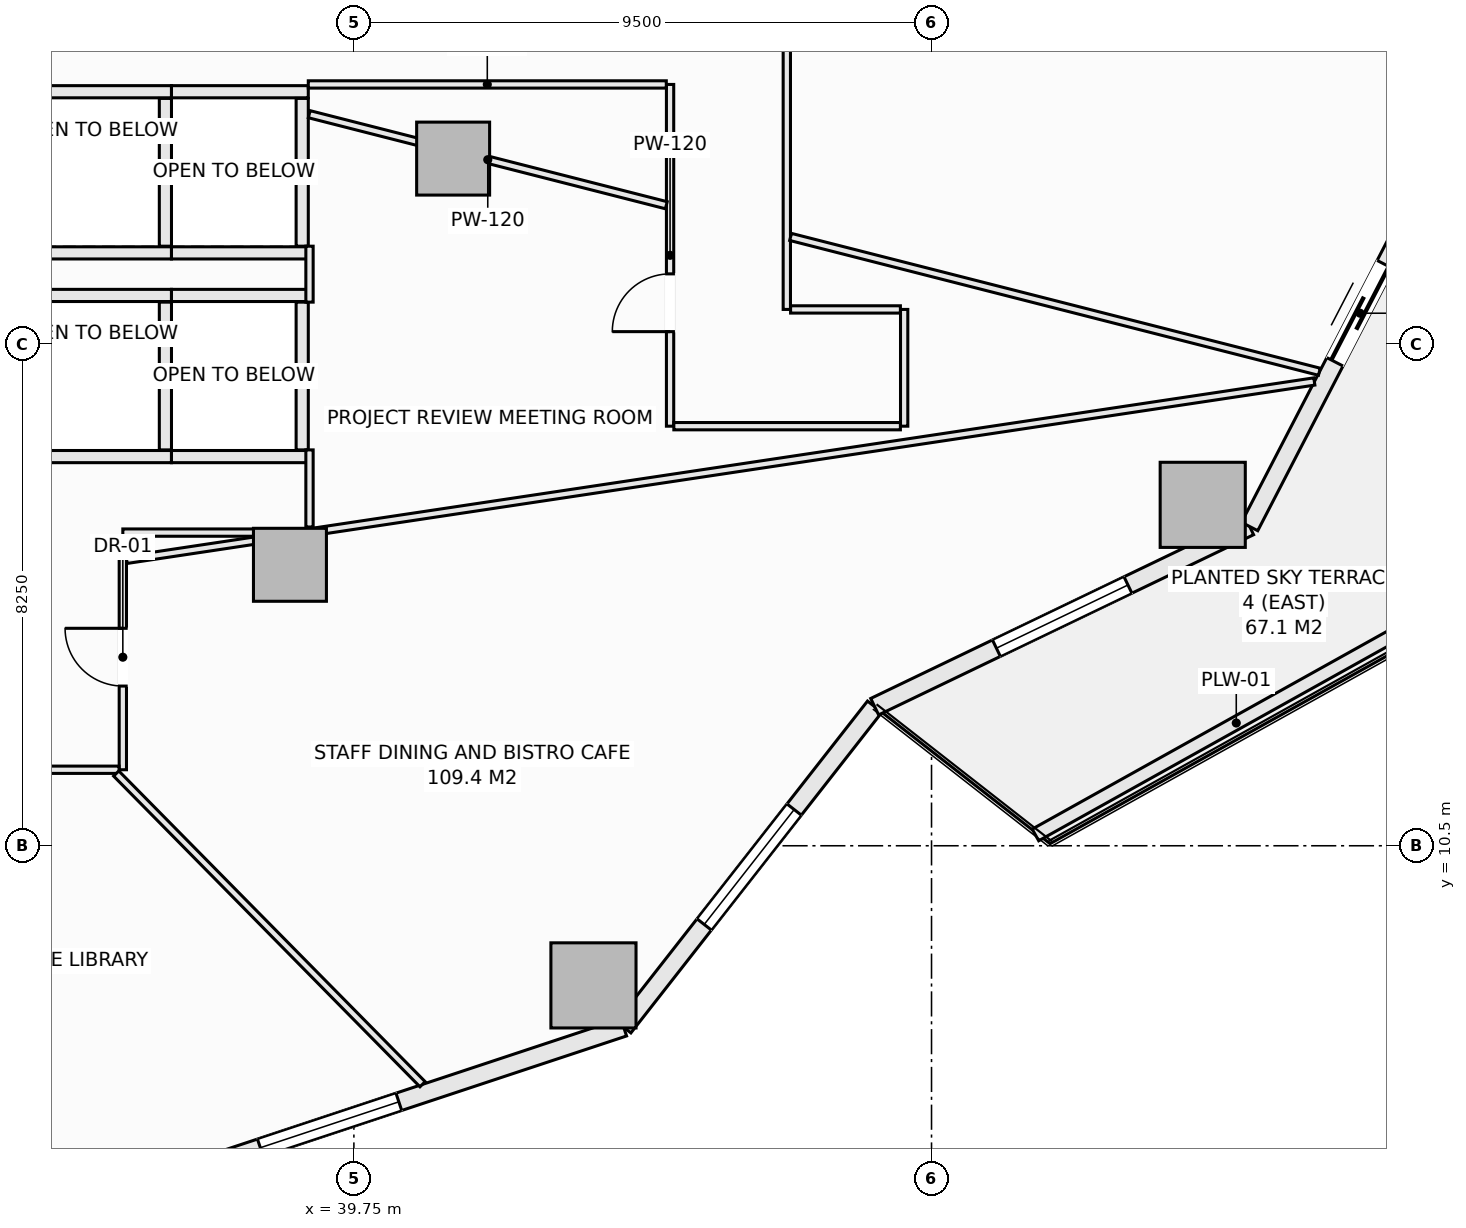
"""IFC4 building model, lengths in metres.
Left out: names, types, materials, properties, quantities, classifications, styles, units other than length and angle.
Written with IfcOpenShell. Run it as: python <this file> out.ifc"""

import sys

from ifc_helpers import new_model, si_unit, direction, frame, frame_2d, origin, origin_2d, place, context, subcontext, project, spatial, rectangle, extrude, element, fill, save


model = new_model("IFC4")
c1 = context("Model", 3, precision=1e-05, world=origin(), true_north=direction((0.0, 1.0)))
c2 = subcontext(c1, "Body", "Model", "MODEL_VIEW")
j1 = project(units=[si_unit("LENGTHUNIT", "METRE"), si_unit("PLANEANGLEUNIT", "RADIAN")], contexts=[c1])
p1 = place(None, origin())
s1 = spatial("IfcSite", under=j1, at=p1, CompositionType="ELEMENT")
p2 = place(p1, origin())
s2 = spatial("IfcBuilding", under=s1, at=p2, CompositionType="ELEMENT")
p3 = place(p2, frame((0.0, 0.0, 49.6)))
s3 = spatial("IfcBuildingStorey", under=s2, at=p3, CompositionType="ELEMENT", Elevation=49.6)
for number, where, z_axis, x_axis in (
    (1, (43.69, 8.204, -0.28), (0.0, 0.0, 1.0), (1.0, 0.0, 0.0)),
    (2, (53.71, 16.106, -0.28), (0.0, 0.0, 1.0), (1.0, 0.0, 0.0)),
):
    element("IfcColumn", number, at=place(p3, frame(where, z_axis=z_axis, x_axis=x_axis)), inside=s3, PredefinedType="COLUMN", context=c2, shape_type="SweptSolid", body=[
        extrude(rectangle(XDim=1.4, YDim=1.4, at=origin_2d()), origin(), (0.0, 0.0, 1.0), 3.85),
    ])
for number, where, z_axis, x_axis in (
    (3, (38.698, 15.121, -0.28), (0.0, 0.0, 1.0), (1.0, 0.0, 0.0)),
    (4, (41.382, 21.801, -0.28), (0.0, 0.0, 1.0), (1.0, 0.0, 0.0)),
):
    element("IfcColumn", number, at=place(p3, frame(where, z_axis=z_axis, x_axis=x_axis)), inside=s3, PredefinedType="COLUMN", context=c2, shape_type="SweptSolid", body=[
        extrude(rectangle(XDim=1.2, YDim=1.2, at=origin_2d()), origin(), (0.0, 0.0, 1.0), 3.85),
    ])
p4 = place(p3, frame((37.404, 5.267, 0.0), z_axis=(0.0, 0.0, 1.0), x_axis=(0.949238715533, 0.31455661006, 0.0)))
e5 = element("IfcWall", 5, at=p4, inside=s3, PredefinedType="SOLIDWALL", context=c2, shape_type="SweptSolid", body=[
    extrude(rectangle(XDim=7.146, YDim=0.3, at=frame_2d((3.573, 0.0))), origin(), (0.0, 0.0, 1.0), 3.093),
])
p5 = place(p4, frame((0.85, 0.0, 0.85)))
e6 = element("IfcOpeningElement", 6, at=p5, cuts=e5, PredefinedType="OPENING", context=c2, shape_type="SweptSolid", body=[
    extrude(rectangle(XDim=2.4, YDim=1.9, at=frame_2d((1.2, 0.95))), frame((0.0, 0.16, 0.0), z_axis=(0.0, -1.0, 0.0), x_axis=(1.0, 0.0, 0.0)), (0.0, 0.0, 1.0), 0.32),
])
p6 = place(p3, frame((44.188, 7.514, 0.0), z_axis=(0.0, 0.0, 1.0), x_axis=(0.616421309777, 0.787416515482, 0.0)))
e7 = element("IfcWall", 7, at=p6, inside=s3, PredefinedType="SOLIDWALL", context=c2, shape_type="SweptSolid", body=[
    extrude(rectangle(XDim=6.696, YDim=0.3, at=frame_2d((3.348, 0.0))), origin(), (0.0, 0.0, 1.0), 3.093),
])
p7 = place(p6, frame((2.148, 0.0, 0.85)))
e8 = element("IfcOpeningElement", 8, at=p7, cuts=e7, PredefinedType="OPENING", context=c2, shape_type="SweptSolid", body=[
    extrude(rectangle(XDim=2.4, YDim=1.9, at=frame_2d((1.2, 0.95))), frame((0.0, 0.16, 0.0), z_axis=(0.0, -1.0, 0.0), x_axis=(1.0, 0.0, 0.0)), (0.0, 0.0, 1.0), 0.32),
])
p8 = place(p3, frame((48.315, 12.787, 0.0), z_axis=(0.0, 0.0, 1.0), x_axis=(0.901360393999, 0.433069786673, 0.0)))
e9 = element("IfcWall", 9, at=p8, inside=s3, PredefinedType="SOLIDWALL", context=c2, shape_type="SweptSolid", body=[
    extrude(rectangle(XDim=6.842, YDim=0.3, at=frame_2d((3.421, 0.0))), origin(), (0.0, 0.0, 1.0), 3.093),
])
p9 = place(p8, frame((2.221, 0.0, 0.85)))
e10 = element("IfcOpeningElement", 10, at=p9, cuts=e9, PredefinedType="OPENING", context=c2, shape_type="SweptSolid", body=[
    extrude(rectangle(XDim=2.4, YDim=1.9, at=frame_2d((1.2, 0.95))), frame((0.0, 0.16, 0.0), z_axis=(0.0, -1.0, 0.0), x_axis=(1.0, 0.0, 0.0)), (0.0, 0.0, 1.0), 0.32),
])
p10 = place(p3, frame((54.482, 15.75, 0.0), z_axis=(0.0, 0.0, 1.0), x_axis=(0.459809804413, 0.88801742312, 0.0)))
e11 = element("IfcWall", 11, at=p10, inside=s3, PredefinedType="SOLIDWALL", context=c2, shape_type="SweptSolid", body=[
    extrude(rectangle(XDim=6.111, YDim=0.3, at=frame_2d((3.055, 0.0))), origin(), (0.0, 0.0, 1.0), 3.093),
])
p11 = place(p10, frame((3.05, 0.0, 0.0)))
e12 = element("IfcOpeningElement", 12, at=p11, cuts=e11, PredefinedType="OPENING", context=c2, shape_type="SweptSolid", body=[
    extrude(rectangle(XDim=1.8, YDim=2.25, at=frame_2d((0.9, 1.125))), frame((0.0, 0.16, 0.0), z_axis=(0.0, -1.0, 0.0), x_axis=(1.0, 0.0, 0.0)), (0.0, 0.0, 1.0), 0.32),
])
p12 = place(p3, frame((50.959, 10.678, 0.0), z_axis=(0.0, 0.0, 1.0), x_axis=(0.873500119739, 0.48682393205, 0.0)))
e13 = element("IfcWall", 13, at=p12, inside=s3, PredefinedType="PARAPET", context=c2, shape_type="SweptSolid", body=[
    extrude(rectangle(XDim=7.562, YDim=0.22, at=frame_2d((3.781, 0.0))), origin(), (0.0, 0.0, 1.0), 0.52),
])
for number, where, z_axis, x_axis in (
    (14, (34.5, 19.55, 0.0), (0.0, 0.0, 1.0), (1.0, 0.0, 0.0)),
    (15, (34.5, 16.9, 0.0), (0.0, 0.0, 1.0), (1.0, 0.0, 0.0)),
):
    element("IfcWall", number, at=place(p3, frame(where, z_axis=z_axis, x_axis=x_axis)), inside=s3, PredefinedType="SOLIDWALL", context=c2, shape_type="SweptSolid", body=[
        extrude(rectangle(XDim=2.25, YDim=0.2, at=frame_2d((1.125, 0.0))), origin(), (0.0, 0.0, 1.0), 3.57),
    ])
p13 = place(p3, frame((36.65, 17.01, 0.0), z_axis=(0.0, 0.0, 1.0), x_axis=(0.0, 1.0, 0.0)))
e16 = element("IfcWall", 16, at=p13, inside=s3, PredefinedType="SOLIDWALL", context=c2, shape_type="SweptSolid", body=[
    extrude(rectangle(XDim=2.43, YDim=0.2, at=frame_2d((1.215, 0.0))), origin(), (0.0, 0.0, 1.0), 3.57),
])
for number, where, z_axis, x_axis in (
    (17, (36.75, 19.55, 0.0), (0.0, 0.0, 1.0), (1.0, 0.0, 0.0)),
    (18, (36.75, 16.9, 0.0), (0.0, 0.0, 1.0), (1.0, 0.0, 0.0)),
):
    element("IfcWall", number, at=place(p3, frame(where, z_axis=z_axis, x_axis=x_axis)), inside=s3, PredefinedType="SOLIDWALL", context=c2, shape_type="SweptSolid", body=[
        extrude(rectangle(XDim=2.25, YDim=0.2, at=frame_2d((1.125, 0.0))), origin(), (0.0, 0.0, 1.0), 3.57),
    ])
p14 = place(p3, frame((38.9, 17.01, 0.0), z_axis=(0.0, 0.0, 1.0), x_axis=(0.0, 1.0, 0.0)))
e19 = element("IfcWall", 19, at=p14, inside=s3, PredefinedType="SOLIDWALL", context=c2, shape_type="SweptSolid", body=[
    extrude(rectangle(XDim=2.43, YDim=0.2, at=frame_2d((1.215, 0.0))), origin(), (0.0, 0.0, 1.0), 3.57),
])
for number, where, z_axis, x_axis in (
    (20, (34.5, 22.9, 0.0), (0.0, 0.0, 1.0), (1.0, 0.0, 0.0)),
    (21, (34.5, 20.25, 0.0), (0.0, 0.0, 1.0), (1.0, 0.0, 0.0)),
):
    element("IfcWall", number, at=place(p3, frame(where, z_axis=z_axis, x_axis=x_axis)), inside=s3, PredefinedType="SOLIDWALL", context=c2, shape_type="SweptSolid", body=[
        extrude(rectangle(XDim=2.25, YDim=0.2, at=frame_2d((1.125, 0.0))), origin(), (0.0, 0.0, 1.0), 3.57),
    ])
p15 = place(p3, frame((36.65, 20.36, 0.0), z_axis=(0.0, 0.0, 1.0), x_axis=(0.0, 1.0, 0.0)))
e22 = element("IfcWall", 22, at=p15, inside=s3, PredefinedType="SOLIDWALL", context=c2, shape_type="SweptSolid", body=[
    extrude(rectangle(XDim=2.43, YDim=0.2, at=frame_2d((1.215, 0.0))), origin(), (0.0, 0.0, 1.0), 3.57),
])
for number, where, z_axis, x_axis in (
    (23, (36.75, 22.9, 0.0), (0.0, 0.0, 1.0), (1.0, 0.0, 0.0)),
    (24, (36.75, 20.25, 0.0), (0.0, 0.0, 1.0), (1.0, 0.0, 0.0)),
):
    element("IfcWall", number, at=place(p3, frame(where, z_axis=z_axis, x_axis=x_axis)), inside=s3, PredefinedType="SOLIDWALL", context=c2, shape_type="SweptSolid", body=[
        extrude(rectangle(XDim=2.25, YDim=0.2, at=frame_2d((1.125, 0.0))), origin(), (0.0, 0.0, 1.0), 3.57),
    ])
p16 = place(p3, frame((38.9, 20.36, 0.0), z_axis=(0.0, 0.0, 1.0), x_axis=(0.0, 1.0, 0.0)))
e25 = element("IfcWall", 25, at=p16, inside=s3, PredefinedType="SOLIDWALL", context=c2, shape_type="SweptSolid", body=[
    extrude(rectangle(XDim=2.43, YDim=0.2, at=frame_2d((1.215, 0.0))), origin(), (0.0, 0.0, 1.0), 3.57),
])
p17 = place(p3, frame((35.95, 15.65, 0.0), z_axis=(0.0, 0.0, 1.0), x_axis=(1.0, 0.0, 0.0)))
e26 = element("IfcWall", 26, at=p17, inside=s3, PredefinedType="PARTITIONING", context=c2, shape_type="SweptSolid", body=[
    extrude(rectangle(XDim=2.291, YDim=0.12, at=frame_2d((1.146, 0.0))), origin(), (0.0, 0.0, 1.0), 3.57),
])
p18 = place(p3, frame((35.95, 11.75, 0.0), z_axis=(0.0, 0.0, 1.0), x_axis=(0.0, 1.0, 0.0)))
e27 = element("IfcWall", 27, at=p18, inside=s3, PredefinedType="PARTITIONING", context=c2, shape_type="SweptSolid", body=[
    extrude(rectangle(XDim=3.838, YDim=0.12, at=frame_2d((1.919, 0.0))), origin(), (0.0, 0.0, 1.0), 3.57),
])
p19 = place(p18, frame((1.376, 0.0, 0.0)))
e28 = element("IfcOpeningElement", 28, at=p19, cuts=e27, PredefinedType="OPENING", context=c2, shape_type="SweptSolid", body=[
    extrude(rectangle(XDim=0.95, YDim=2.1, at=frame_2d((0.475, 1.05))), frame((0.0, 0.07, 0.0), z_axis=(0.0, -1.0, 0.0), x_axis=(1.0, 0.0, 0.0)), (0.0, 0.0, 1.0), 0.14),
])
p20 = place(p3, frame((27.242, 11.75, 0.0), z_axis=(0.0, 0.0, 1.0), x_axis=(1.0, 0.0, 0.0)))
e29 = element("IfcWall", 29, at=p20, inside=s3, PredefinedType="PARTITIONING", context=c2, shape_type="SweptSolid", body=[
    extrude(rectangle(XDim=8.646, YDim=0.12, at=frame_2d((4.323, 0.0))), origin(), (0.0, 0.0, 1.0), 3.57),
])
p21 = place(p20, frame((2.311, 0.0, 0.0)))
e30 = element("IfcOpeningElement", 30, at=p21, cuts=e29, PredefinedType="OPENING", context=c2, shape_type="SweptSolid", body=[
    extrude(rectangle(XDim=0.95, YDim=2.1, at=frame_2d((0.475, 1.05))), frame((0.0, 0.07, 0.0), z_axis=(0.0, -1.0, 0.0), x_axis=(1.0, 0.0, 0.0)), (0.0, 0.0, 1.0), 0.14),
])
p22 = place(p20, frame((6.099, 0.0, 0.0)))
e31 = element("IfcOpeningElement", 31, at=p22, cuts=e29, PredefinedType="OPENING", context=c2, shape_type="SweptSolid", body=[
    extrude(rectangle(XDim=0.95, YDim=2.1, at=frame_2d((0.475, 1.05))), frame((0.0, 0.07, 0.0), z_axis=(0.0, -1.0, 0.0), x_axis=(1.0, 0.0, 0.0)), (0.0, 0.0, 1.0), 0.14),
])
p23 = place(p3, frame((44.95, 17.4, 0.0), z_axis=(0.0, 0.0, 1.0), x_axis=(0.0, 1.0, 0.0)))
e32 = element("IfcWall", 32, at=p23, inside=s3, PredefinedType="PARTITIONING", context=c2, shape_type="SweptSolid", body=[
    extrude(rectangle(XDim=5.62, YDim=0.12, at=frame_2d((2.81, 0.0))), origin(), (0.0, 0.0, 1.0), 3.57),
])
p24 = place(p23, frame((1.555, 0.0, 0.0)))
e33 = element("IfcOpeningElement", 33, at=p24, cuts=e32, PredefinedType="OPENING", context=c2, shape_type="SweptSolid", body=[
    extrude(rectangle(XDim=0.95, YDim=2.1, at=frame_2d((0.475, 1.05))), frame((0.0, 0.07, 0.0), z_axis=(0.0, -1.0, 0.0), x_axis=(1.0, 0.0, 0.0)), (0.0, 0.0, 1.0), 0.14),
])
p25 = place(p3, frame((48.8, 17.4, 0.0), z_axis=(0.0, 0.0, 1.0), x_axis=(0.0, 1.0, 0.0)))
e34 = element("IfcWall", 34, at=p25, inside=s3, PredefinedType="PARTITIONING", context=c2, shape_type="SweptSolid", body=[
    extrude(rectangle(XDim=1.92, YDim=0.12, at=frame_2d((0.96, 0.0))), origin(), (0.0, 0.0, 1.0), 3.57),
])
p26 = place(p3, frame((46.87, 19.32, 0.0), z_axis=(0.0, 0.0, 1.0), x_axis=(0.0, 1.0, 0.0)))
e35 = element("IfcWall", 35, at=p26, inside=s3, PredefinedType="PARTITIONING", context=c2, shape_type="SweptSolid", body=[
    extrude(rectangle(XDim=14.798, YDim=0.12, at=frame_2d((7.399, 0.0))), origin(), (0.0, 0.0, 1.0), 3.57),
])
p27 = place(p26, frame((5.265, 0.0, 0.0)))
e36 = element("IfcOpeningElement", 36, at=p27, cuts=e35, PredefinedType="OPENING", context=c2, shape_type="SweptSolid", body=[
    extrude(rectangle(XDim=0.95, YDim=2.1, at=frame_2d((0.475, 1.05))), frame((0.0, 0.07, 0.0), z_axis=(0.0, -1.0, 0.0), x_axis=(1.0, 0.0, 0.0)), (0.0, 0.0, 1.0), 0.14),
])
p28 = place(p26, frame((11.845, 0.0, 0.0)))
e37 = element("IfcOpeningElement", 37, at=p28, cuts=e35, PredefinedType="OPENING", context=c2, shape_type="SweptSolid", body=[
    extrude(rectangle(XDim=0.95, YDim=2.1, at=frame_2d((0.475, 1.05))), frame((0.0, 0.07, 0.0), z_axis=(0.0, -1.0, 0.0), x_axis=(1.0, 0.0, 0.0)), (0.0, 0.0, 1.0), 0.14),
])
p29 = place(p3, frame((46.932, 19.32, 0.0), z_axis=(0.0, 0.0, 1.0), x_axis=(1.0, 0.0, 0.0)))
e38 = element("IfcWall", 38, at=p29, inside=s3, PredefinedType="PARTITIONING", context=c2, shape_type="SweptSolid", body=[
    extrude(rectangle(XDim=1.806, YDim=0.12, at=frame_2d((0.903, 0.0))), origin(), (0.0, 0.0, 1.0), 2.362),
])
p30 = place(p3, frame((45.012, 17.4, 0.0), z_axis=(0.0, 0.0, 1.0), x_axis=(1.0, 0.0, 0.0)))
e39 = element("IfcWall", 39, at=p30, inside=s3, PredefinedType="PARTITIONING", context=c2, shape_type="SweptSolid", body=[
    extrude(rectangle(XDim=3.726, YDim=0.12, at=frame_2d((1.863, 0.0))), origin(), (0.0, 0.0, 1.0), 3.57),
])
p31 = place(p3, frame((39.0, 23.02, 0.0), z_axis=(0.0, 0.0, 1.0), x_axis=(1.0, 0.0, 0.0)))
e40 = element("IfcWall", 40, at=p31, inside=s3, PredefinedType="PARTITIONING", context=c2, shape_type="SweptSolid", body=[
    extrude(rectangle(XDim=5.888, YDim=0.12, at=frame_2d((2.944, 0.0))), origin(), (0.0, 0.0, 1.0), 3.57),
])
p32 = place(p3, frame((39.02, 15.742, 0.0), z_axis=(0.0, 0.0, 1.0), x_axis=(0.0, 1.0, 0.0)))
e41 = element("IfcWall", 41, at=p32, inside=s3, PredefinedType="PARTITIONING", context=c2, shape_type="SweptSolid", body=[
    extrude(rectangle(XDim=1.268, YDim=0.12, at=frame_2d((0.634, 0.0))), origin(), (0.0, 0.0, 1.0), 2.934),
])
p33 = place(p3, frame((39.02, 19.44, 0.0), z_axis=(0.0, 0.0, 1.0), x_axis=(0.0, 1.0, 0.0)))
e42 = element("IfcWall", 42, at=p33, inside=s3, PredefinedType="PARTITIONING", context=c2, shape_type="SweptSolid", body=[
    extrude(rectangle(XDim=0.92, YDim=0.12, at=frame_2d((0.46, 0.0))), origin(), (0.0, 0.0, 1.0), 3.57),
])
p34 = place(p3, frame((39.015, 22.531, 0.0), z_axis=(0.0, 0.0, 1.0), x_axis=(0.968999219603, -0.247063782066, 0.0)))
e43 = element("IfcWall", 43, at=p34, inside=s3, PredefinedType="PARTITIONING", context=c2, shape_type="SweptSolid", body=[
    extrude(rectangle(XDim=6.061, YDim=0.12, at=frame_2d((3.03, 0.0))), origin(), (0.0, 0.0, 1.0), 2.362),
])
p35 = place(p3, frame((46.932, 20.512, 0.0), z_axis=(0.0, 0.0, 1.0), x_axis=(0.969002278344, -0.247051785187, 0.0)))
e44 = element("IfcWall", 44, at=p35, inside=s3, PredefinedType="PARTITIONING", context=c2, shape_type="SweptSolid", body=[
    extrude(rectangle(XDim=8.975, YDim=0.12, at=frame_2d((4.488, 0.0))), origin(), (0.0, 0.0, 1.0), 3.57),
])
p36 = place(p3, frame((36.012, 15.202, 0.0), z_axis=(0.0, 0.0, 1.0), x_axis=(0.988905340033, 0.148547058049, 0.0)))
e45 = element("IfcWall", 45, at=p36, inside=s3, PredefinedType="PARTITIONING", context=c2, shape_type="SweptSolid", body=[
    extrude(rectangle(XDim=2.196, YDim=0.12, at=frame_2d((1.098, 0.0))), origin(), (0.0, 0.0, 1.0), 2.934),
])
p37 = place(p3, frame((38.241, 15.537, 0.0), z_axis=(0.0, 0.0, 1.0), x_axis=(0.988910037188, 0.148515784849, 0.0)))
e46 = element("IfcWall", 46, at=p37, inside=s3, PredefinedType="PARTITIONING", context=c2, shape_type="SweptSolid", body=[
    extrude(rectangle(XDim=17.499, YDim=0.12, at=frame_2d((8.75, 0.0))), origin(), (0.0, 0.0, 1.0), 2.362),
])
p38 = place(p3, frame((35.841, 11.688, 0.0), z_axis=(0.0, 0.0, 1.0), x_axis=(0.702122050881, -0.712056616897, 0.0)))
e47 = element("IfcWall", 47, at=p38, inside=s3, PredefinedType="PARTITIONING", context=c2, shape_type="SweptSolid", body=[
    extrude(rectangle(XDim=7.176, YDim=0.12, at=frame_2d((3.588, 0.0))), origin(), (0.0, 0.0, 1.0), 3.57),
])
p39 = place(p5, origin())
e48 = element("IfcWindow", 48, at=p39, inside=s3, PartitioningType="SINGLE_PANEL", PredefinedType="WINDOW", context=c2, shape_type="SweptSolid", body=[
    extrude(rectangle(XDim=2.4, YDim=1.9, at=frame_2d((1.2, 0.95))), frame((0.0, 0.03, 0.0), z_axis=(0.0, -1.0, 0.0), x_axis=(1.0, 0.0, 0.0)), (0.0, 0.0, 1.0), 0.06),
])
fill(e6, e48)
p40 = place(p7, origin())
e49 = element("IfcWindow", 49, at=p40, inside=s3, PartitioningType="SINGLE_PANEL", PredefinedType="WINDOW", context=c2, shape_type="SweptSolid", body=[
    extrude(rectangle(XDim=2.4, YDim=1.9, at=frame_2d((1.2, 0.95))), frame((0.0, 0.03, 0.0), z_axis=(0.0, -1.0, 0.0), x_axis=(1.0, 0.0, 0.0)), (0.0, 0.0, 1.0), 0.06),
])
fill(e8, e49)
p41 = place(p9, origin())
e50 = element("IfcWindow", 50, at=p41, inside=s3, PartitioningType="SINGLE_PANEL", PredefinedType="WINDOW", context=c2, shape_type="SweptSolid", body=[
    extrude(rectangle(XDim=2.4, YDim=1.9, at=frame_2d((1.2, 0.95))), frame((0.0, 0.03, 0.0), z_axis=(0.0, -1.0, 0.0), x_axis=(1.0, 0.0, 0.0)), (0.0, 0.0, 1.0), 0.06),
])
fill(e10, e50)
p42 = place(p11, frame((1.8, 0.0, 0.0), z_axis=(0.0, 0.0, 1.0), x_axis=(-1.0, 0.0, 0.0)))
e51 = element("IfcDoor", 51, at=p42, inside=s3, OperationType="SLIDING_TO_LEFT", PredefinedType="DOOR", context=c2, shape_type="SweptSolid", body=[
    extrude(rectangle(XDim=1.8, YDim=2.25, at=frame_2d((0.9, 1.125))), frame((0.0, 0.025, 0.0), z_axis=(0.0, -1.0, 0.0), x_axis=(1.0, 0.0, 0.0)), (0.0, 0.0, 1.0), 0.05),
])
fill(e12, e51)
p43 = place(p19, origin())
e52 = element("IfcDoor", 52, at=p43, inside=s3, OperationType="SINGLE_SWING_RIGHT", PredefinedType="DOOR", context=c2, shape_type="SweptSolid", body=[
    extrude(rectangle(XDim=0.95, YDim=2.1, at=frame_2d((0.475, 1.05))), frame((0.0, 0.025, 0.0), z_axis=(0.0, -1.0, 0.0), x_axis=(1.0, 0.0, 0.0)), (0.0, 0.0, 1.0), 0.05),
])
fill(e28, e52)
p44 = place(p24, origin())
e53 = element("IfcDoor", 53, at=p44, inside=s3, OperationType="SINGLE_SWING_LEFT", PredefinedType="DOOR", context=c2, shape_type="SweptSolid", body=[
    extrude(rectangle(XDim=0.95, YDim=2.1, at=frame_2d((0.475, 1.05))), frame((0.0, 0.025, 0.0), z_axis=(0.0, -1.0, 0.0), x_axis=(1.0, 0.0, 0.0)), (0.0, 0.0, 1.0), 0.05),
])
fill(e33, e53)
save(model, sys.argv[1])
